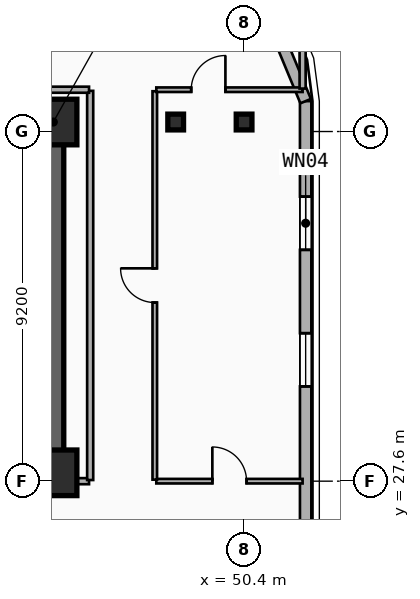
"""IFC4 building model, lengths in metres.
Left out: names, types, materials, properties, quantities, classifications, styles, units other than length and angle.
Written with IfcOpenShell. Run it as: python <this file> out.ifc"""

import sys

from ifc_helpers import new_model, si_unit, direction, frame, frame_2d, origin, origin_2d, place, context, subcontext, project, spatial, rectangle, i_section, extrude, element, fill, save


model = new_model("IFC4")
c1 = context("Model", 3, precision=1e-05, world=origin(), true_north=direction((0.0, 1.0)))
c2 = subcontext(c1, "Body", "Model", "MODEL_VIEW")
j1 = project(units=[si_unit("LENGTHUNIT", "METRE"), si_unit("PLANEANGLEUNIT", "RADIAN")], contexts=[c1])
p1 = place(None, origin())
s1 = spatial("IfcSite", under=j1, at=p1, CompositionType="ELEMENT")
p2 = place(p1, origin())
s2 = spatial("IfcBuilding", under=s1, at=p2, CompositionType="ELEMENT")
p3 = place(p2, frame((0.0, 0.0, 173.2)))
s3 = spatial("IfcBuildingStorey", under=s2, at=p3, CompositionType="ELEMENT", Elevation=173.2)
p4 = place(p3, frame((12.15, 37.05, 0.0), z_axis=(0.0, 0.0, 1.0), x_axis=(1.0, 0.0, 0.0)))
e1 = element("IfcWall", 1, at=p4, inside=s3, PredefinedType="SHEAR", context=c2, shape_type="SweptSolid", body=[
    extrude(rectangle(XDim=33.23, YDim=0.55, at=frame_2d((16.615, 0.0))), origin(), (0.0, 0.0, 1.0), 3.55),
])
p5 = place(p3, frame((45.38, 27.82, 0.0), z_axis=(0.0, 0.0, 1.0), x_axis=(-1.0, 0.0, 0.0)))
e2 = element("IfcWall", 2, at=p5, inside=s3, PredefinedType="SHEAR", context=c2, shape_type="SweptSolid", body=[
    extrude(rectangle(XDim=12.23, YDim=0.55, at=frame_2d((6.115, 0.0))), origin(), (0.0, 0.0, 1.0), 3.55),
])
p6 = place(p5, frame((9.93, 0.0, 0.0)))
e3 = element("IfcOpeningElement", 3, at=p6, cuts=e2, PredefinedType="OPENING", context=c2, shape_type="SweptSolid", body=[
    extrude(rectangle(XDim=1.1, YDim=2.15, at=frame_2d((0.55, 1.075))), frame((0.0, 0.285, 0.0), z_axis=(0.0, -1.0, 0.0), x_axis=(1.0, 0.0, 0.0)), (0.0, 0.0, 1.0), 0.57),
])
p7 = place(p5, frame((6.23, 0.0, 0.0)))
e4 = element("IfcOpeningElement", 4, at=p7, cuts=e2, PredefinedType="OPENING", context=c2, shape_type="SweptSolid", body=[
    extrude(rectangle(XDim=1.1, YDim=2.15, at=frame_2d((0.55, 1.075))), frame((0.0, 0.285, 0.0), z_axis=(0.0, -1.0, 0.0), x_axis=(1.0, 0.0, 0.0)), (0.0, 0.0, 1.0), 0.57),
])
p8 = place(p3, frame((45.38, 28.095, 0.0), z_axis=(0.0, 0.0, 1.0), x_axis=(0.0, 1.0, 0.0)))
e5 = element("IfcWall", 5, at=p8, inside=s3, PredefinedType="SHEAR", context=c2, shape_type="SweptSolid", body=[
    extrude(rectangle(XDim=8.68, YDim=0.55, at=frame_2d((4.34, 0.0))), origin(), (0.0, 0.0, 1.0), 3.55),
])
for number, where, z_axis, x_axis in (
    (6, (45.4, 27.82, 0.0), (0.0, 0.0, 1.0), (1.0, 0.0, 0.0)),
    (7, (45.4, 37.05, 0.0), (0.0, 0.0, 1.0), (1.0, 0.0, 0.0)),
):
    element("IfcColumn", number, at=place(p3, frame(where, z_axis=z_axis, x_axis=x_axis)), inside=s3, PredefinedType="COLUMN", context=c2, shape_type="SweptSolid", body=[
        extrude(rectangle(XDim=1.2, YDim=1.2, at=origin_2d()), origin(), (0.0, 0.0, 1.0), 3.55),
    ])
for number, where, z_axis, x_axis in (
    (8, (48.6, 37.05, 0.0), (0.0, 0.0, 1.0), (1.0, 0.0, 0.0)),
    (9, (50.4, 37.05, 0.0), (0.0, 0.0, 1.0), (1.0, 0.0, 0.0)),
):
    element("IfcColumn", number, at=place(p3, frame(where, z_axis=z_axis, x_axis=x_axis)), inside=s3, PredefinedType="COLUMN", context=c2, shape_type="SweptSolid", body=[
        extrude(i_section(OverallWidth=0.413, OverallDepth=0.415, WebThickness=0.03, FlangeThickness=0.047, FilletRadius=0.015, at=origin_2d()), origin(), (0.0, 0.0, 1.0), 3.55),
    ])
p9 = place(p3, frame((52.02, 37.6, 0.0), z_axis=(0.0, 0.0, 1.0), x_axis=(0.0, -1.0, 0.0)))
e10 = element("IfcWall", 10, at=p9, inside=s3, PredefinedType="SOLIDWALL", context=c2, shape_type="SweptSolid", body=[
    extrude(rectangle(XDim=23.0, YDim=0.3, at=frame_2d((11.5, 0.0))), origin(), (0.0, 0.0, 1.0), 3.29),
])
p10 = place(p9, frame((2.513, 0.0, 0.34)))
e11 = element("IfcOpeningElement", 11, at=p10, cuts=e10, PredefinedType="OPENING", context=c2, shape_type="SweptSolid", body=[
    extrude(rectangle(XDim=1.4, YDim=2.1, at=frame_2d((0.7, 1.05))), frame((0.0, 0.16, 0.0), z_axis=(0.0, -1.0, 0.0), x_axis=(1.0, 0.0, 0.0)), (0.0, 0.0, 1.0), 0.32),
])
p11 = place(p9, frame((6.107, 0.0, 0.34)))
e12 = element("IfcOpeningElement", 12, at=p11, cuts=e10, PredefinedType="OPENING", context=c2, shape_type="SweptSolid", body=[
    extrude(rectangle(XDim=1.4, YDim=2.1, at=frame_2d((0.7, 1.05))), frame((0.0, 0.16, 0.0), z_axis=(0.0, -1.0, 0.0), x_axis=(1.0, 0.0, 0.0)), (0.0, 0.0, 1.0), 0.32),
])
p12 = place(p9, frame((14.86, 0.0, 0.34)))
e13 = element("IfcOpeningElement", 13, at=p12, cuts=e10, PredefinedType="OPENING", context=c2, shape_type="SweptSolid", body=[
    extrude(rectangle(XDim=1.4, YDim=2.1, at=frame_2d((0.7, 1.05))), frame((0.0, 0.16, 0.0), z_axis=(0.0, -1.0, 0.0), x_axis=(1.0, 0.0, 0.0)), (0.0, 0.0, 1.0), 0.32),
])
p13 = place(p9, frame((18.77, 0.0, 0.34)))
e14 = element("IfcOpeningElement", 14, at=p13, cuts=e10, PredefinedType="OPENING", context=c2, shape_type="SweptSolid", body=[
    extrude(rectangle(XDim=1.4, YDim=2.1, at=frame_2d((0.7, 1.05))), frame((0.0, 0.16, 0.0), z_axis=(0.0, -1.0, 0.0), x_axis=(1.0, 0.0, 0.0)), (0.0, 0.0, 1.0), 0.32),
])
p14 = place(p3, frame((50.843, 40.443, 0.0), z_axis=(0.0, 0.0, 1.0), x_axis=(0.382704529509, -0.923870793506, 0.0)))
e15 = element("IfcWall", 15, at=p14, inside=s3, PredefinedType="SOLIDWALL", context=c2, shape_type="SweptSolid", body=[
    extrude(rectangle(XDim=3.077, YDim=0.3, at=frame_2d((1.538, 0.0))), origin(), (0.0, 0.0, 1.0), 3.29),
])
p15 = place(p3, frame((48.09, 27.6, 0.0), z_axis=(0.0, 0.0, 1.0), x_axis=(1.0, 0.0, 0.0)))
e16 = element("IfcWall", 16, at=p15, inside=s3, PredefinedType="PARTITIONING", context=c2, shape_type="SweptSolid", body=[
    extrude(rectangle(XDim=3.85, YDim=0.12, at=frame_2d((1.925, 0.0))), origin(), (0.0, 0.0, 1.0), 2.62),
])
p16 = place(p15, frame((1.475, 0.0, 0.0)))
e17 = element("IfcOpeningElement", 17, at=p16, cuts=e16, PredefinedType="OPENING", context=c2, shape_type="SweptSolid", body=[
    extrude(rectangle(XDim=0.9, YDim=2.1, at=frame_2d((0.45, 1.05))), frame((0.0, 0.07, 0.0), z_axis=(0.0, -1.0, 0.0), x_axis=(1.0, 0.0, 0.0)), (0.0, 0.0, 1.0), 0.14),
])
p17 = place(p3, frame((48.05, 27.64, 0.0), z_axis=(0.0, 0.0, 1.0), x_axis=(0.0, 1.0, 0.0)))
e18 = element("IfcWall", 18, at=p17, inside=s3, PredefinedType="PARTITIONING", context=c2, shape_type="SweptSolid", body=[
    extrude(rectangle(XDim=10.22, YDim=0.12, at=frame_2d((5.11, 0.0))), origin(), (0.0, 0.0, 1.0), 2.77),
])
p18 = place(p17, frame((4.66, 0.0, 0.0)))
e19 = element("IfcOpeningElement", 19, at=p18, cuts=e18, PredefinedType="OPENING", context=c2, shape_type="SweptSolid", body=[
    extrude(rectangle(XDim=0.9, YDim=2.1, at=frame_2d((0.45, 1.05))), frame((0.0, 0.07, 0.0), z_axis=(0.0, -1.0, 0.0), x_axis=(1.0, 0.0, 0.0)), (0.0, 0.0, 1.0), 0.14),
])
p19 = place(p3, frame((48.09, 37.9, 0.0), z_axis=(0.0, 0.0, 1.0), x_axis=(1.0, 0.0, 0.0)))
e20 = element("IfcWall", 20, at=p19, inside=s3, PredefinedType="PARTITIONING", context=c2, shape_type="SweptSolid", body=[
    extrude(rectangle(XDim=3.85, YDim=0.12, at=frame_2d((1.925, 0.0))), origin(), (0.0, 0.0, 1.0), 3.29),
])
p20 = place(p19, frame((0.919, 0.0, 0.0)))
e21 = element("IfcOpeningElement", 21, at=p20, cuts=e20, PredefinedType="OPENING", context=c2, shape_type="SweptSolid", body=[
    extrude(rectangle(XDim=0.9, YDim=2.1, at=frame_2d((0.45, 1.05))), frame((0.0, 0.07, 0.0), z_axis=(0.0, -1.0, 0.0), x_axis=(1.0, 0.0, 0.0)), (0.0, 0.0, 1.0), 0.14),
])
p21 = place(p3, frame((45.41, 27.6, 0.0), z_axis=(0.0, 0.0, 1.0), x_axis=(1.0, 0.0, 0.0)))
e22 = element("IfcWall", 22, at=p21, inside=s3, PredefinedType="PARTITIONING", context=c2, shape_type="SweptSolid", body=[
    extrude(rectangle(XDim=0.91, YDim=0.16, at=frame_2d((0.455, 0.0))), origin(), (0.0, 0.0, 1.0), 2.36),
])
p22 = place(p3, frame((46.35, 27.63, 0.0), z_axis=(0.0, 0.0, 1.0), x_axis=(0.0, 1.0, 0.0)))
e23 = element("IfcWall", 23, at=p22, inside=s3, PredefinedType="PARTITIONING", context=c2, shape_type="SweptSolid", body=[
    extrude(rectangle(XDim=10.24, YDim=0.16, at=frame_2d((5.12, 0.0))), origin(), (0.0, 0.0, 1.0), 2.77),
])
p23 = place(p3, frame((11.28, 37.9, 0.0), z_axis=(0.0, 0.0, 1.0), x_axis=(1.0, 0.0, 0.0)))
e24 = element("IfcWall", 24, at=p23, inside=s3, PredefinedType="PARTITIONING", context=c2, shape_type="SweptSolid", body=[
    extrude(rectangle(XDim=35.04, YDim=0.16, at=frame_2d((17.52, 0.0))), origin(), (0.0, 0.0, 1.0), 3.29),
])
p24 = place(p3, frame((51.94, 37.93, 0.0), z_axis=(0.0, 0.0, 1.0), x_axis=(0.0, 1.0, 0.0)))
e25 = element("IfcWall", 25, at=p24, inside=s3, PredefinedType="PARTITIONING", context=c2, shape_type="SweptSolid", body=[
    extrude(rectangle(XDim=1.44, YDim=0.16, at=frame_2d((0.72, 0.0))), origin(), (0.0, 0.0, 1.0), 3.29),
])
p25 = place(p10, origin())
e26 = element("IfcWindow", 26, at=p25, inside=s3, PartitioningType="SINGLE_PANEL", PredefinedType="WINDOW", context=c2, shape_type="SweptSolid", body=[
    extrude(rectangle(XDim=1.4, YDim=2.1, at=frame_2d((0.7, 1.05))), frame((0.0, 0.03, 0.0), z_axis=(0.0, -1.0, 0.0), x_axis=(1.0, 0.0, 0.0)), (0.0, 0.0, 1.0), 0.06),
])
fill(e11, e26)
p26 = place(p11, origin())
e27 = element("IfcWindow", 27, at=p26, inside=s3, PartitioningType="SINGLE_PANEL", PredefinedType="WINDOW", context=c2, shape_type="SweptSolid", body=[
    extrude(rectangle(XDim=1.4, YDim=2.1, at=frame_2d((0.7, 1.05))), frame((0.0, 0.03, 0.0), z_axis=(0.0, -1.0, 0.0), x_axis=(1.0, 0.0, 0.0)), (0.0, 0.0, 1.0), 0.06),
])
fill(e12, e27)
p27 = place(p16, origin())
e28 = element("IfcDoor", 28, at=p27, inside=s3, OperationType="SINGLE_SWING_LEFT", PredefinedType="DOOR", context=c2, shape_type="SweptSolid", body=[
    extrude(rectangle(XDim=0.9, YDim=2.1, at=frame_2d((0.45, 1.05))), frame((0.0, 0.025, 0.0), z_axis=(0.0, -1.0, 0.0), x_axis=(1.0, 0.0, 0.0)), (0.0, 0.0, 1.0), 0.05),
])
fill(e17, e28)
p28 = place(p18, origin())
e29 = element("IfcDoor", 29, at=p28, inside=s3, OperationType="SINGLE_SWING_RIGHT", PredefinedType="DOOR", context=c2, shape_type="SweptSolid", body=[
    extrude(rectangle(XDim=0.9, YDim=2.1, at=frame_2d((0.45, 1.05))), frame((0.0, 0.025, 0.0), z_axis=(0.0, -1.0, 0.0), x_axis=(1.0, 0.0, 0.0)), (0.0, 0.0, 1.0), 0.05),
])
fill(e19, e29)
p29 = place(p20, origin())
e30 = element("IfcDoor", 30, at=p29, inside=s3, OperationType="SINGLE_SWING_RIGHT", PredefinedType="DOOR", context=c2, shape_type="SweptSolid", body=[
    extrude(rectangle(XDim=0.9, YDim=2.1, at=frame_2d((0.45, 1.05))), frame((0.0, 0.025, 0.0), z_axis=(0.0, -1.0, 0.0), x_axis=(1.0, 0.0, 0.0)), (0.0, 0.0, 1.0), 0.05),
])
fill(e21, e30)
save(model, sys.argv[1])
